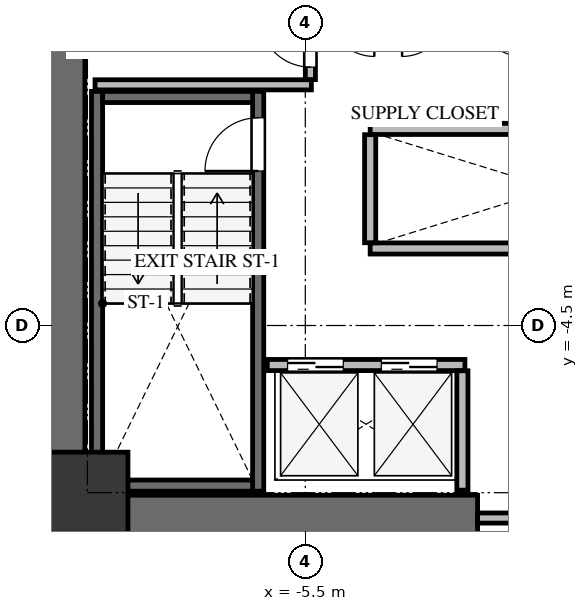
"""IFC4 building model, lengths in metres.
Left out: names, types, materials, properties, quantities, classifications, styles, units other than length and angle.
Written with IfcOpenShell. Run it as: python <this file> out.ifc"""

import sys

from ifc_helpers import new_model, si_unit, direction, frame, frame_2d, origin, origin_2d, place, context, subcontext, project, spatial, rectangle, extrude, source, transform, mapped, element, fill, save


model = new_model("IFC4")
c1 = context("Model", 3, precision=1e-05, world=origin(), true_north=direction((0.0, 1.0)))
c2 = subcontext(c1, "Body", "Model", "MODEL_VIEW")
j1 = project(units=[si_unit("LENGTHUNIT", "METRE"), si_unit("PLANEANGLEUNIT", "RADIAN")], contexts=[c1])
p1 = place(None, origin())
s1 = spatial("IfcSite", under=j1, at=p1, CompositionType="ELEMENT")
p2 = place(p1, origin())
s2 = spatial("IfcBuilding", under=s1, at=p2, CompositionType="ELEMENT")
p3 = place(p2, frame((0.0, 0.0, 55.5)))
s3 = spatial("IfcBuildingStorey", under=s2, at=p3, CompositionType="ELEMENT", Elevation=55.5)
p4 = place(p3, frame((-10.3, -8.75, 0.0), z_axis=(0.0, 0.0, 1.0), x_axis=(0.0, 1.0, 0.0)))
e1 = element("IfcWall", 1, at=p4, inside=s3, PredefinedType="SHEAR", context=c2, shape_type="SweptSolid", body=[
    extrude(rectangle(XDim=17.5, YDim=0.9, at=frame_2d((8.75, 0.0))), origin(), (0.0, 0.0, 1.0), 3.3),
])
p5 = place(p3, frame((-9.85, -8.3, 0.0), z_axis=(0.0, 0.0, 1.0), x_axis=(1.0, 0.0, 0.0)))
e2 = element("IfcWall", 2, at=p5, inside=s3, PredefinedType="SHEAR", context=c2, shape_type="SweptSolid", body=[
    extrude(rectangle(XDim=7.75, YDim=0.9, at=frame_2d((3.875, 0.0))), origin(), (0.0, 0.0, 1.0), 3.3),
])
p6 = place(p3, frame((-6.43, -7.77, -0.24), z_axis=(0.0, 0.0, 1.0), x_axis=(0.0, 1.0, 0.0)))
e3 = element("IfcWall", 3, at=p6, inside=s3, PredefinedType="SHEAR", context=c2, shape_type="SweptSolid", body=[
    extrude(rectangle(XDim=7.89, YDim=0.22, at=frame_2d((3.945, 0.0))), origin(), (0.0, 0.0, 1.0), 3.3),
])
p7 = place(p6, frame((6.32, 0.0, 0.0)))
e4 = element("IfcOpeningElement", 4, at=p7, cuts=e3, PredefinedType="OPENING", context=c2, shape_type="SweptSolid", body=[
    extrude(rectangle(XDim=1.05, YDim=2.15, at=frame_2d((0.525, 1.075))), frame((0.0, 0.12, 0.0), z_axis=(0.0, -1.0, 0.0), x_axis=(1.0, 0.0, 0.0)), (0.0, 0.0, 1.0), 0.24),
])
p8 = place(p3, frame((-9.61, 0.12, -0.24), z_axis=(0.0, 0.0, 1.0), x_axis=(0.0, -1.0, 0.0)))
e5 = element("IfcWall", 5, at=p8, inside=s3, PredefinedType="SHEAR", context=c2, shape_type="SweptSolid", body=[
    extrude(rectangle(XDim=7.89, YDim=0.22, at=frame_2d((3.945, 0.0))), origin(), (0.0, 0.0, 1.0), 3.3),
])
for number, where, z_axis, x_axis in (
    (6, (-9.5, -7.66, -0.24), (0.0, 0.0, 1.0), (1.0, 0.0, 0.0)),
    (7, (-6.54, 0.01, -0.24), (0.0, 0.0, 1.0), (-1.0, 0.0, 0.0)),
):
    element("IfcWall", number, at=place(p3, frame(where, z_axis=z_axis, x_axis=x_axis)), inside=s3, PredefinedType="SHEAR", context=c2, shape_type="SweptSolid", body=[
        extrude(rectangle(XDim=2.96, YDim=0.22, at=frame_2d((1.48, 0.0))), origin(), (0.0, 0.0, 1.0), 3.3),
    ])
m1 = source(origin(), c2, "Body", "SweptSolid", [
    extrude(rectangle(XDim=1.6, YDim=1.6, at=origin_2d()), origin(), (0.0, 0.0, 1.0), 3.3),
])
p9 = place(p3, frame((-9.8, -7.8, -0.24), z_axis=(0.0, 0.0, 1.0), x_axis=(1.0, 0.0, 0.0)))
e8 = element("IfcColumn", 8, at=p9, inside=s3, PredefinedType="COLUMN", context=c2, shape_type="MappedRepresentation", body=[
    mapped(m1, transform((0.0, 0.0, 0.0), x_axis=(1.0, 0.0, 0.0), y_axis=(0.0, 1.0, 0.0), z_axis=(0.0, 0.0, 1.0), scale=1.0)),
])
p10 = place(p3, frame((-2.1, -8.3, 0.0), z_axis=(0.0, 0.0, 1.0), x_axis=(1.0, 0.0, 0.0)))
e9 = element("IfcWall", 9, at=p10, inside=s3, PredefinedType="SOLIDWALL", context=c2, shape_type="SweptSolid", body=[
    extrude(rectangle(XDim=4.2, YDim=0.2, at=frame_2d((2.1, 0.0))), origin(), (0.0, 0.0, 1.0), 3.045),
])
p11 = place(p10, frame((1.2, 0.0, 0.0)))
e10 = element("IfcOpeningElement", 10, at=p11, cuts=e9, PredefinedType="OPENING", context=c2, shape_type="SweptSolid", body=[
    extrude(rectangle(XDim=1.8, YDim=2.15, at=frame_2d((0.9, 1.075))), frame((0.0, 0.11, 0.0), z_axis=(0.0, -1.0, 0.0), x_axis=(1.0, 0.0, 0.0)), (0.0, 0.0, 1.0), 0.22),
])
p12 = place(p3, frame((-9.65, 0.25, 0.0), z_axis=(0.0, 0.0, 1.0), x_axis=(1.0, 0.0, 0.0)))
e11 = element("IfcWall", 11, at=p12, inside=s3, PredefinedType="SOLIDWALL", context=c2, shape_type="SweptSolid", body=[
    extrude(rectangle(XDim=4.27, YDim=0.2, at=frame_2d((2.135, 0.0))), origin(), (0.0, 0.0, 1.0), 3.045),
])
p13 = place(p3, frame((-5.4, 0.354, 0.0), z_axis=(0.0, 0.0, 1.0), x_axis=(0.0, 1.0, 0.0)))
e12 = element("IfcWall", 12, at=p13, inside=s3, PredefinedType="SOLIDWALL", context=c2, shape_type="SweptSolid", body=[
    extrude(rectangle(XDim=4.026, YDim=0.2, at=frame_2d((2.013, 0.0))), origin(), (0.0, 0.0, 1.0), 3.045),
])
p14 = place(p13, frame((0.246, 0.0, 0.0)))
e13 = element("IfcOpeningElement", 13, at=p14, cuts=e12, PredefinedType="OPENING", context=c2, shape_type="SweptSolid", body=[
    extrude(rectangle(XDim=1.0, YDim=2.15, at=frame_2d((0.5, 1.075))), frame((0.0, 0.11, 0.0), z_axis=(0.0, -1.0, 0.0), x_axis=(1.0, 0.0, 0.0)), (0.0, 0.0, 1.0), 0.22),
])
p15 = place(p3, frame((-6.25, -5.28, 0.0), z_axis=(0.0, 0.0, 1.0), x_axis=(1.0, 0.0, 0.0)))
e14 = element("IfcWall", 14, at=p15, inside=s3, PredefinedType="SOLIDWALL", context=c2, shape_type="SweptSolid", body=[
    extrude(rectangle(XDim=3.9, YDim=0.22, at=frame_2d((1.95, 0.0))), origin(), (0.0, 0.0, 1.0), 3.045),
])
p16 = place(p15, frame((0.4, 0.0, 0.0)))
e15 = element("IfcOpeningElement", 15, at=p16, cuts=e14, PredefinedType="OPENING", context=c2, shape_type="SweptSolid", body=[
    extrude(rectangle(XDim=1.1, YDim=2.15, at=frame_2d((0.55, 1.075))), frame((0.0, 0.12, 0.0), z_axis=(0.0, -1.0, 0.0), x_axis=(1.0, 0.0, 0.0)), (0.0, 0.0, 1.0), 0.24),
])
p17 = place(p15, frame((2.25, 0.0, 0.0)))
e16 = element("IfcOpeningElement", 16, at=p17, cuts=e14, PredefinedType="OPENING", context=c2, shape_type="SweptSolid", body=[
    extrude(rectangle(XDim=1.1, YDim=2.15, at=frame_2d((0.55, 1.075))), frame((0.0, 0.12, 0.0), z_axis=(0.0, -1.0, 0.0), x_axis=(1.0, 0.0, 0.0)), (0.0, 0.0, 1.0), 0.24),
])
p18 = place(p3, frame((-2.4, -7.75, 0.0), z_axis=(0.0, 0.0, 1.0), x_axis=(0.0, 1.0, 0.0)))
e17 = element("IfcWall", 17, at=p18, inside=s3, PredefinedType="SOLIDWALL", context=c2, shape_type="SweptSolid", body=[
    extrude(rectangle(XDim=2.356, YDim=0.22, at=frame_2d((1.178, 0.0))), origin(), (0.0, 0.0, 1.0), 3.045),
])
for number, where, z_axis, x_axis in (
    (18, (-4.22, -2.98, 0.0), (0.0, 0.0, 1.0), (1.0, 0.0, 0.0)),
    (19, (-4.22, -0.62, 0.0), (0.0, 0.0, 1.0), (1.0, 0.0, 0.0)),
):
    element("IfcWall", number, at=place(p3, frame(where, z_axis=z_axis, x_axis=x_axis)), inside=s3, PredefinedType="SOLIDWALL", context=c2, shape_type="SweptSolid", body=[
        extrude(rectangle(XDim=7.24, YDim=0.22, at=frame_2d((3.62, 0.0))), origin(), (0.0, 0.0, 1.0), 3.045),
    ])
p19 = place(p3, frame((-4.22, -2.866, 0.0), z_axis=(0.0, 0.0, 1.0), x_axis=(0.0, 1.0, 0.0)))
e20 = element("IfcWall", 20, at=p19, inside=s3, PredefinedType="SOLIDWALL", context=c2, shape_type="SweptSolid", body=[
    extrude(rectangle(XDim=2.132, YDim=0.22, at=frame_2d((1.066, 0.0))), origin(), (0.0, 0.0, 1.0), 3.045),
])
m2 = source(origin(), c2, "Body", "SweptSolid", [
    extrude(rectangle(XDim=1.05, YDim=2.15, at=frame_2d((0.525, 1.075))), frame((0.0, 0.025, 0.0), z_axis=(0.0, -1.0, 0.0), x_axis=(1.0, 0.0, 0.0)), (0.0, 0.0, 1.0), 0.05),
])
p20 = place(p7, origin())
e21 = element("IfcDoor", 21, at=p20, inside=s3, OperationType="SINGLE_SWING_LEFT", PredefinedType="DOOR", context=c2, shape_type="MappedRepresentation", body=[
    mapped(m2, transform((0.0, 0.0, 0.0), x_axis=(1.0, 0.0, 0.0), y_axis=(0.0, 1.0, 0.0), z_axis=(0.0, 0.0, 1.0), scale=1.0)),
])
fill(e4, e21)
m3 = source(origin(), c2, "Body", "SweptSolid", [
    extrude(rectangle(XDim=1.0, YDim=2.15, at=frame_2d((0.5, 1.075))), frame((0.0, 0.025, 0.0), z_axis=(0.0, -1.0, 0.0), x_axis=(1.0, 0.0, 0.0)), (0.0, 0.0, 1.0), 0.05),
])
p21 = place(p14, origin())
e22 = element("IfcDoor", 22, at=p21, inside=s3, OperationType="SINGLE_SWING_RIGHT", PredefinedType="DOOR", context=c2, shape_type="MappedRepresentation", body=[
    mapped(m3, transform((0.0, 0.0, 0.0), x_axis=(1.0, 0.0, 0.0), y_axis=(0.0, 1.0, 0.0), z_axis=(0.0, 0.0, 1.0), scale=1.0)),
])
fill(e13, e22)
m4 = source(origin(), c2, "Body", "SweptSolid", [
    extrude(rectangle(XDim=1.1, YDim=2.15, at=frame_2d((0.55, 1.075))), frame((0.0, 0.025, 0.0), z_axis=(0.0, -1.0, 0.0), x_axis=(1.0, 0.0, 0.0)), (0.0, 0.0, 1.0), 0.05),
])
p22 = place(p16, origin())
e23 = element("IfcDoor", 23, at=p22, inside=s3, OperationType="DOUBLE_DOOR_SLIDING", PredefinedType="DOOR", context=c2, shape_type="MappedRepresentation", body=[
    mapped(m4, transform((0.0, 0.0, 0.0), x_axis=(1.0, 0.0, 0.0), y_axis=(0.0, 1.0, 0.0), z_axis=(0.0, 0.0, 1.0), scale=1.0)),
])
fill(e15, e23)
p23 = place(p17, origin())
e24 = element("IfcDoor", 24, at=p23, inside=s3, OperationType="DOUBLE_DOOR_SLIDING", PredefinedType="DOOR", context=c2, shape_type="MappedRepresentation", body=[
    mapped(m4, transform((0.0, 0.0, 0.0), x_axis=(1.0, 0.0, 0.0), y_axis=(0.0, 1.0, 0.0), z_axis=(0.0, 0.0, 1.0), scale=1.0)),
])
fill(e16, e24)
save(model, sys.argv[1])
